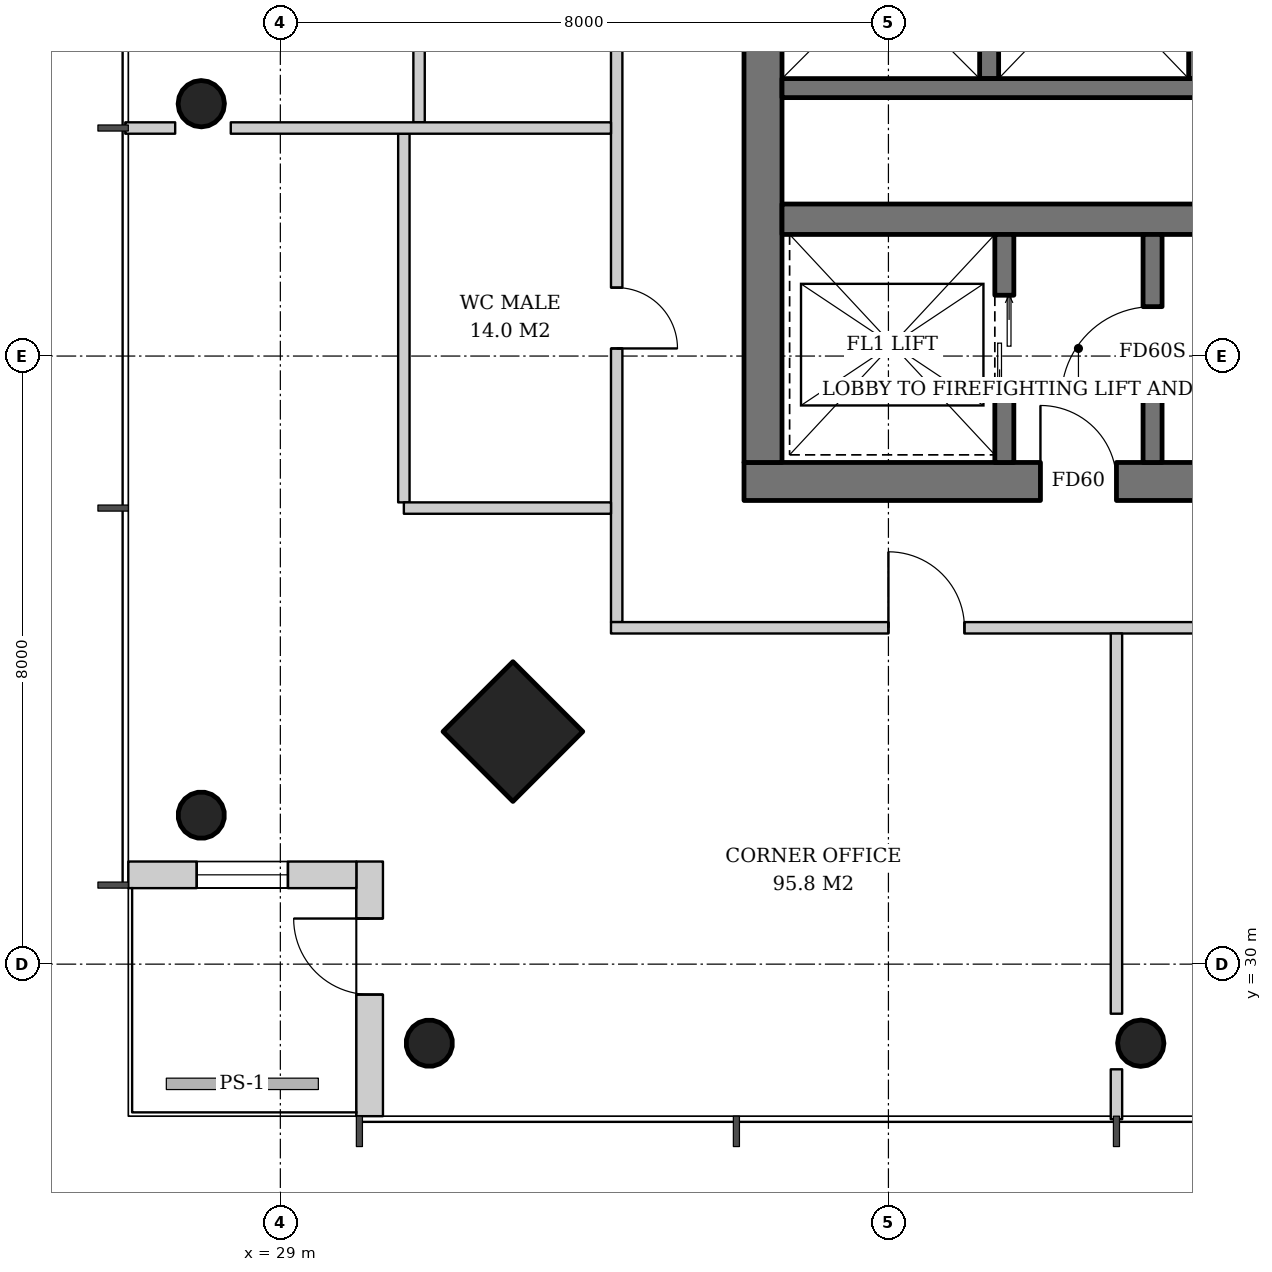
"""IFC4 building model, lengths in metres.
Left out: names, types, materials, properties, quantities, classifications, styles, units other than length and angle.
Written with IfcOpenShell. Run it as: python <this file> out.ifc"""

import sys

from ifc_helpers import new_model, si_unit, direction, frame, frame_2d, origin, origin_2d, place, context, subcontext, project, spatial, rectangle, hollow_circle, extrude, element, fill, save


model = new_model("IFC4")
c1 = context("Model", 3, precision=1e-05, world=origin(), true_north=direction((0.0, 1.0)))
c2 = subcontext(c1, "Body", "Model", "MODEL_VIEW")
j1 = project(units=[si_unit("LENGTHUNIT", "METRE"), si_unit("PLANEANGLEUNIT", "RADIAN")], contexts=[c1])
p1 = place(None, origin())
s1 = spatial("IfcSite", under=j1, at=p1, CompositionType="ELEMENT")
p2 = place(p1, origin())
s2 = spatial("IfcBuilding", under=s1, at=p2, CompositionType="ELEMENT")
p3 = place(p2, frame((0.0, 0.0, 237.6)))
s3 = spatial("IfcBuildingStorey", under=s2, at=p3, CompositionType="ELEMENT", Elevation=237.6)
p4 = place(p3, frame((32.021, 33.021, 0.0), z_axis=(0.031900153262, 0.031900153262, 0.998981861919), x_axis=(-0.707106781187, 0.707106781187, 0.0)))
e1 = element("IfcColumn", 1, at=p4, inside=s3, PredefinedType="COLUMN", context=c2, shape_type="SweptSolid", body=[
    extrude(rectangle(XDim=1.3, YDim=1.3, at=origin_2d()), origin(), (0.0, 0.0, 1.0), 3.804),
])
p5 = place(p3, frame((27.921, 31.921, 0.0), z_axis=(0.031964207655, 0.031964207655, 0.998977766949), x_axis=(-0.707106781187, 0.707106781187, 0.0)))
e2 = element("IfcColumn", 2, at=p5, inside=s3, PredefinedType="COLUMN", context=c2, shape_type="SweptSolid", body=[
    extrude(hollow_circle(Radius=0.305, WallThickness=0.025, at=origin_2d()), origin(), (0.0, 0.0, 1.0), 3.804),
])
p6 = place(p3, frame((27.921, 41.307, 0.0), z_axis=(0.031978732291, 0.01065957743, 0.999431705566), x_axis=(-0.316227766017, 0.948683298051, 0.0)))
e3 = element("IfcColumn", 3, at=p6, inside=s3, PredefinedType="COLUMN", context=c2, shape_type="SweptSolid", body=[
    extrude(hollow_circle(Radius=0.305, WallThickness=0.025, at=origin_2d()), origin(), (0.0, 0.0, 1.0), 3.802),
])
p7 = place(p3, frame((30.921, 28.921, 0.0), z_axis=(0.031964207655, 0.031964207655, 0.998977766949), x_axis=(-0.707106781187, 0.707106781187, 0.0)))
e4 = element("IfcColumn", 4, at=p7, inside=s3, PredefinedType="COLUMN", context=c2, shape_type="SweptSolid", body=[
    extrude(hollow_circle(Radius=0.305, WallThickness=0.025, at=origin_2d()), origin(), (0.0, 0.0, 1.0), 3.804),
])
p8 = place(p3, frame((40.307, 28.921, 0.0), z_axis=(0.01065957743, 0.031978732291, 0.999431705566), x_axis=(-0.948683298051, 0.316227766017, 0.0)))
e5 = element("IfcColumn", 5, at=p8, inside=s3, PredefinedType="COLUMN", context=c2, shape_type="SweptSolid", body=[
    extrude(hollow_circle(Radius=0.305, WallThickness=0.025, at=origin_2d()), origin(), (0.0, 0.0, 1.0), 3.802),
])
p9 = place(p3, frame((35.1, 36.35, 0.0), z_axis=(0.0, 0.0, 1.0), x_axis=(1.0, 0.0, 0.0)))
e6 = element("IfcWall", 6, at=p9, inside=s3, PredefinedType="SHEAR", context=c2, shape_type="SweptSolid", body=[
    extrude(rectangle(XDim=19.8, YDim=0.5, at=frame_2d((9.9, 0.0))), origin(), (0.0, 0.0, 1.0), 3.8),
])
p10 = place(p9, frame((3.9, 0.0, 0.0)))
e7 = element("IfcOpeningElement", 7, at=p10, cuts=e6, PredefinedType="OPENING", context=c2, shape_type="SweptSolid", body=[
    extrude(rectangle(XDim=1.0, YDim=2.1, at=frame_2d((0.5, 1.05))), frame((0.0, 0.26, 0.0), z_axis=(0.0, -1.0, 0.0), x_axis=(1.0, 0.0, 0.0)), (0.0, 0.0, 1.0), 0.52),
])
p11 = place(p9, frame((15.35, 0.0, 0.0)))
e8 = element("IfcOpeningElement", 8, at=p11, cuts=e6, PredefinedType="OPENING", context=c2, shape_type="SweptSolid", body=[
    extrude(rectangle(XDim=1.0, YDim=2.1, at=frame_2d((0.5, 1.05))), frame((0.0, 0.26, 0.0), z_axis=(0.0, -1.0, 0.0), x_axis=(1.0, 0.0, 0.0)), (0.0, 0.0, 1.0), 0.52),
])
p12 = place(p3, frame((35.35, 36.6, 0.0), z_axis=(0.0, 0.0, 1.0), x_axis=(0.0, 1.0, 0.0)))
e9 = element("IfcWall", 9, at=p12, inside=s3, PredefinedType="SHEAR", context=c2, shape_type="SweptSolid", body=[
    extrude(rectangle(XDim=18.8, YDim=0.5, at=frame_2d((9.4, 0.0))), origin(), (0.0, 0.0, 1.0), 3.8),
])
p13 = place(p12, frame((8.5, 0.0, 0.0)))
e10 = element("IfcOpeningElement", 10, at=p13, cuts=e9, PredefinedType="OPENING", context=c2, shape_type="SweptSolid", body=[
    extrude(rectangle(XDim=1.8, YDim=2.4, at=frame_2d((0.9, 1.2))), frame((0.0, 0.26, 0.0), z_axis=(0.0, -1.0, 0.0), x_axis=(1.0, 0.0, 0.0)), (0.0, 0.0, 1.0), 0.52),
])
p14 = place(p3, frame((35.6, 39.8, 0.0), z_axis=(0.0, 0.0, 1.0), x_axis=(1.0, 0.0, 0.0)))
e11 = element("IfcWall", 11, at=p14, inside=s3, PredefinedType="SHEAR", context=c2, shape_type="SweptSolid", body=[
    extrude(rectangle(XDim=18.8, YDim=0.4, at=frame_2d((9.4, 0.0))), origin(), (0.0, 0.0, 1.0), 3.8),
])
p15 = place(p3, frame((30.175, 28.0, 0.0), z_axis=(0.0, 0.0, 1.0), x_axis=(0.0, 1.0, 0.0)))
e12 = element("IfcWall", 12, at=p15, inside=s3, PredefinedType="SOLIDWALL", context=c2, shape_type="SweptSolid", body=[
    extrude(rectangle(XDim=3.35, YDim=0.35, at=frame_2d((1.675, 0.0))), origin(), (0.0, 0.0, 1.0), 3.62),
])
p16 = place(p15, frame((1.6, 0.0, 0.0)))
e13 = element("IfcOpeningElement", 13, at=p16, cuts=e12, PredefinedType="OPENING", context=c2, shape_type="SweptSolid", body=[
    extrude(rectangle(XDim=1.0, YDim=2.4, at=frame_2d((0.5, 1.2))), frame((0.0, 0.185, 0.0), z_axis=(0.0, -1.0, 0.0), x_axis=(1.0, 0.0, 0.0)), (0.0, 0.0, 1.0), 0.37),
])
p17 = place(p3, frame((30.0, 31.175, 0.0), z_axis=(0.0, 0.0, 1.0), x_axis=(-1.0, 0.0, 0.0)))
e14 = element("IfcWall", 14, at=p17, inside=s3, PredefinedType="SOLIDWALL", context=c2, shape_type="SweptSolid", body=[
    extrude(rectangle(XDim=3.0, YDim=0.35, at=frame_2d((1.5, 0.0))), origin(), (0.0, 0.0, 1.0), 3.62),
])
p18 = place(p17, frame((0.9, 0.0, 0.6)))
e15 = element("IfcOpeningElement", 15, at=p18, cuts=e14, PredefinedType="OPENING", context=c2, shape_type="SweptSolid", body=[
    extrude(rectangle(XDim=1.2, YDim=2.55, at=frame_2d((0.6, 1.275))), frame((0.0, 0.185, 0.0), z_axis=(0.0, -1.0, 0.0), x_axis=(1.0, 0.0, 0.0)), (0.0, 0.0, 1.0), 0.37),
])
p19 = place(p3, frame((38.525, 36.6, 0.0), z_axis=(0.0, 0.0, 1.0), x_axis=(0.0, 1.0, 0.0)))
e16 = element("IfcWall", 16, at=p19, inside=s3, PredefinedType="SHEAR", context=c2, shape_type="SweptSolid", body=[
    extrude(rectangle(XDim=3.0, YDim=0.25, at=frame_2d((1.5, 0.0))), origin(), (0.0, 0.0, 1.0), 3.8),
])
p20 = place(p19, frame((0.9, 0.0, 0.0)))
e17 = element("IfcOpeningElement", 17, at=p20, cuts=e16, PredefinedType="OPENING", context=c2, shape_type="SweptSolid", body=[
    extrude(rectangle(XDim=1.3, YDim=2.2, at=frame_2d((0.65, 1.1))), frame((0.0, 0.135, 0.0), z_axis=(0.0, -1.0, 0.0), x_axis=(1.0, 0.0, 0.0)), (0.0, 0.0, 1.0), 0.27),
])
p21 = place(p3, frame((40.475, 36.6, 0.0), z_axis=(0.0, 0.0, 1.0), x_axis=(0.0, 1.0, 0.0)))
e18 = element("IfcWall", 18, at=p21, inside=s3, PredefinedType="SHEAR", context=c2, shape_type="SweptSolid", body=[
    extrude(rectangle(XDim=3.0, YDim=0.25, at=frame_2d((1.5, 0.0))), origin(), (0.0, 0.0, 1.0), 3.8),
])
p22 = place(p21, frame((0.85, 0.0, 0.0)))
e19 = element("IfcOpeningElement", 19, at=p22, cuts=e18, PredefinedType="OPENING", context=c2, shape_type="SweptSolid", body=[
    extrude(rectangle(XDim=1.2, YDim=2.1, at=frame_2d((0.6, 1.05))), frame((0.0, 0.135, 0.0), z_axis=(0.0, -1.0, 0.0), x_axis=(1.0, 0.0, 0.0)), (0.0, 0.0, 1.0), 0.27),
])
for number, where, z_axis, x_axis in (
    (20, (38.325, 44.25, 0.0), (0.0, 0.0, 1.0), (0.0, -1.0, 0.0)),
    (21, (41.075, 44.25, 0.0), (0.0, 0.0, 1.0), (0.0, -1.0, 0.0)),
):
    element("IfcWall", number, at=place(p3, frame(where, z_axis=z_axis, x_axis=x_axis)), inside=s3, PredefinedType="SHEAR", context=c2, shape_type="SweptSolid", body=[
        extrude(rectangle(XDim=2.6, YDim=0.25, at=frame_2d((1.3, 0.0))), origin(), (0.0, 0.0, 1.0), 3.8),
    ])
p23 = place(p3, frame((35.6, 41.525, 0.0), z_axis=(0.0, 0.0, 1.0), x_axis=(1.0, 0.0, 0.0)))
e22 = element("IfcWall", 22, at=p23, inside=s3, PredefinedType="SHEAR", context=c2, shape_type="SweptSolid", body=[
    extrude(rectangle(XDim=11.1, YDim=0.25, at=frame_2d((5.55, 0.0))), origin(), (0.0, 0.0, 1.0), 3.8),
])
for number, where, z_axis, x_axis in (
    (23, (30.825, 45.925, 0.0), (0.0, 0.0, 1.0), (0.0, -1.0, 0.0)),
    (24, (30.625, 40.925, 0.0), (0.0, 0.0, 1.0), (0.0, -1.0, 0.0)),
):
    element("IfcWall", number, at=place(p3, frame(where, z_axis=z_axis, x_axis=x_axis)), inside=s3, PredefinedType="PARTITIONING", context=c2, shape_type="SweptSolid", body=[
        extrude(rectangle(XDim=4.85, YDim=0.15, at=frame_2d((2.425, 0.0))), origin(), (0.0, 0.0, 1.0), 3.12),
    ])
p24 = place(p3, frame((33.425, 57.65, 0.0), z_axis=(0.0, 0.0, 1.0), x_axis=(0.0, -1.0, 0.0)))
e25 = element("IfcWall", 25, at=p24, inside=s3, PredefinedType="PARTITIONING", context=c2, shape_type="SweptSolid", body=[
    extrude(rectangle(XDim=23.15, YDim=0.15, at=frame_2d((11.575, 0.0))), origin(), (0.0, 0.0, 1.0), 3.02),
])
p25 = place(p24, frame((3.65, 0.0, 0.0)))
e26 = element("IfcOpeningElement", 26, at=p25, cuts=e25, PredefinedType="OPENING", context=c2, shape_type="SweptSolid", body=[
    extrude(rectangle(XDim=1.0, YDim=2.1, at=frame_2d((0.5, 1.05))), frame((0.0, 0.085, 0.0), z_axis=(0.0, -1.0, 0.0), x_axis=(1.0, 0.0, 0.0)), (0.0, 0.0, 1.0), 0.17),
])
p26 = place(p24, frame((8.75, 0.0, 0.0)))
e27 = element("IfcOpeningElement", 27, at=p26, cuts=e25, PredefinedType="OPENING", context=c2, shape_type="SweptSolid", body=[
    extrude(rectangle(XDim=0.8, YDim=2.1, at=frame_2d((0.4, 1.05))), frame((0.0, 0.085, 0.0), z_axis=(0.0, -1.0, 0.0), x_axis=(1.0, 0.0, 0.0)), (0.0, 0.0, 1.0), 0.17),
])
p27 = place(p24, frame((13.65, 0.0, 0.0)))
e28 = element("IfcOpeningElement", 28, at=p27, cuts=e25, PredefinedType="OPENING", context=c2, shape_type="SweptSolid", body=[
    extrude(rectangle(XDim=1.0, YDim=2.1, at=frame_2d((0.5, 1.05))), frame((0.0, 0.085, 0.0), z_axis=(0.0, -1.0, 0.0), x_axis=(1.0, 0.0, 0.0)), (0.0, 0.0, 1.0), 0.17),
])
p28 = place(p24, frame((18.75, 0.0, 0.0)))
e29 = element("IfcOpeningElement", 29, at=p28, cuts=e25, PredefinedType="OPENING", context=c2, shape_type="SweptSolid", body=[
    extrude(rectangle(XDim=0.8, YDim=2.1, at=frame_2d((0.4, 1.05))), frame((0.0, 0.085, 0.0), z_axis=(0.0, -1.0, 0.0), x_axis=(1.0, 0.0, 0.0)), (0.0, 0.0, 1.0), 0.17),
])
p29 = place(p3, frame((33.35, 41.0, 0.0), z_axis=(0.0, 0.0, 1.0), x_axis=(-1.0, 0.0, 0.0)))
e30 = element("IfcWall", 30, at=p29, inside=s3, PredefinedType="PARTITIONING", context=c2, shape_type="SweptSolid", body=[
    extrude(rectangle(XDim=5.002, YDim=0.15, at=frame_2d((2.501, 0.0))), origin(), (0.0, 0.0, 1.0), 3.62),
])
p30 = place(p3, frame((27.616, 41.0, 0.0), z_axis=(0.0, 0.0, 1.0), x_axis=(-1.0, 0.0, 0.0)))
e31 = element("IfcWall", 31, at=p30, inside=s3, PredefinedType="PARTITIONING", context=c2, shape_type="SweptSolid", body=[
    extrude(rectangle(XDim=0.656, YDim=0.15, at=frame_2d((0.328, 0.0))), origin(), (0.0, 0.0, 1.0), 3.62),
])
p31 = place(p3, frame((33.35, 36.0, 0.0), z_axis=(0.0, 0.0, 1.0), x_axis=(-1.0, 0.0, 0.0)))
e32 = element("IfcWall", 32, at=p31, inside=s3, PredefinedType="PARTITIONING", context=c2, shape_type="SweptSolid", body=[
    extrude(rectangle(XDim=2.725, YDim=0.15, at=frame_2d((1.363, 0.0))), origin(), (0.0, 0.0, 1.0), 3.62),
])
p32 = place(p3, frame((33.35, 34.425, 0.0), z_axis=(0.0, 0.0, 1.0), x_axis=(1.0, 0.0, 0.0)))
e33 = element("IfcWall", 33, at=p32, inside=s3, PredefinedType="PARTITIONING", context=c2, shape_type="SweptSolid", body=[
    extrude(rectangle(XDim=23.15, YDim=0.15, at=frame_2d((11.575, 0.0))), origin(), (0.0, 0.0, 1.0), 3.02),
])
p33 = place(p32, frame((3.65, 0.0, 0.0)))
e34 = element("IfcOpeningElement", 34, at=p33, cuts=e33, PredefinedType="OPENING", context=c2, shape_type="SweptSolid", body=[
    extrude(rectangle(XDim=1.0, YDim=2.1, at=frame_2d((0.5, 1.05))), frame((0.0, 0.085, 0.0), z_axis=(0.0, -1.0, 0.0), x_axis=(1.0, 0.0, 0.0)), (0.0, 0.0, 1.0), 0.17),
])
p34 = place(p32, frame((8.65, 0.0, 0.0)))
e35 = element("IfcOpeningElement", 35, at=p34, cuts=e33, PredefinedType="OPENING", context=c2, shape_type="SweptSolid", body=[
    extrude(rectangle(XDim=1.0, YDim=2.1, at=frame_2d((0.5, 1.05))), frame((0.0, 0.085, 0.0), z_axis=(0.0, -1.0, 0.0), x_axis=(1.0, 0.0, 0.0)), (0.0, 0.0, 1.0), 0.17),
])
p35 = place(p32, frame((13.65, 0.0, 0.0)))
e36 = element("IfcOpeningElement", 36, at=p35, cuts=e33, PredefinedType="OPENING", context=c2, shape_type="SweptSolid", body=[
    extrude(rectangle(XDim=1.0, YDim=2.1, at=frame_2d((0.5, 1.05))), frame((0.0, 0.085, 0.0), z_axis=(0.0, -1.0, 0.0), x_axis=(1.0, 0.0, 0.0)), (0.0, 0.0, 1.0), 0.17),
])
p36 = place(p3, frame((40.0, 34.35, 0.0), z_axis=(0.0, 0.0, 1.0), x_axis=(0.0, -1.0, 0.0)))
e37 = element("IfcWall", 37, at=p36, inside=s3, PredefinedType="PARTITIONING", context=c2, shape_type="SweptSolid", body=[
    extrude(rectangle(XDim=5.002, YDim=0.15, at=frame_2d((2.501, 0.0))), origin(), (0.0, 0.0, 1.0), 3.62),
])
p37 = place(p3, frame((40.0, 28.616, 0.0), z_axis=(0.0, 0.0, 1.0), x_axis=(0.0, -1.0, 0.0)))
e38 = element("IfcWall", 38, at=p37, inside=s3, PredefinedType="PARTITIONING", context=c2, shape_type="SweptSolid", body=[
    extrude(rectangle(XDim=0.656, YDim=0.15, at=frame_2d((0.328, 0.0))), origin(), (0.0, 0.0, 1.0), 3.62),
])
p38 = place(p16, origin())
e39 = element("IfcDoor", 39, at=p38, inside=s3, OperationType="SINGLE_SWING_RIGHT", PredefinedType="DOOR", context=c2, shape_type="SweptSolid", body=[
    extrude(rectangle(XDim=1.0, YDim=2.4, at=frame_2d((0.5, 1.2))), frame((0.0, 0.025, 0.0), z_axis=(0.0, -1.0, 0.0), x_axis=(1.0, 0.0, 0.0)), (0.0, 0.0, 1.0), 0.05),
])
fill(e13, e39)
p39 = place(p18, origin())
e40 = element("IfcWindow", 40, at=p39, inside=s3, PartitioningType="SINGLE_PANEL", PredefinedType="WINDOW", context=c2, shape_type="SweptSolid", body=[
    extrude(rectangle(XDim=1.2, YDim=2.55, at=frame_2d((0.6, 1.275))), frame((0.0, 0.03, 0.0), z_axis=(0.0, -1.0, 0.0), x_axis=(1.0, 0.0, 0.0)), (0.0, 0.0, 1.0), 0.06),
])
fill(e15, e40)
p40 = place(p20, origin())
e41 = element("IfcDoor", 41, at=p40, inside=s3, OperationType="DOUBLE_DOOR_SLIDING", PredefinedType="DOOR", context=c2, shape_type="SweptSolid", body=[
    extrude(rectangle(XDim=1.3, YDim=2.2, at=frame_2d((0.65, 1.1))), frame((0.0, 0.025, 0.0), z_axis=(0.0, -1.0, 0.0), x_axis=(1.0, 0.0, 0.0)), (0.0, 0.0, 1.0), 0.05),
])
fill(e17, e41)
p41 = place(p22, origin())
e42 = element("IfcDoor", 42, at=p41, inside=s3, OperationType="SINGLE_SWING_LEFT", PredefinedType="DOOR", context=c2, shape_type="SweptSolid", body=[
    extrude(rectangle(XDim=1.2, YDim=2.1, at=frame_2d((0.6, 1.05))), frame((0.0, 0.025, 0.0), z_axis=(0.0, -1.0, 0.0), x_axis=(1.0, 0.0, 0.0)), (0.0, 0.0, 1.0), 0.05),
])
fill(e19, e42)
p42 = place(p10, origin())
e43 = element("IfcDoor", 43, at=p42, inside=s3, OperationType="SINGLE_SWING_LEFT", PredefinedType="DOOR", context=c2, shape_type="SweptSolid", body=[
    extrude(rectangle(XDim=1.0, YDim=2.1, at=frame_2d((0.5, 1.05))), frame((0.0, 0.025, 0.0), z_axis=(0.0, -1.0, 0.0), x_axis=(1.0, 0.0, 0.0)), (0.0, 0.0, 1.0), 0.05),
])
fill(e7, e43)
p43 = place(p28, origin())
e44 = element("IfcDoor", 44, at=p43, inside=s3, OperationType="SINGLE_SWING_RIGHT", PredefinedType="DOOR", context=c2, shape_type="SweptSolid", body=[
    extrude(rectangle(XDim=0.8, YDim=2.1, at=frame_2d((0.4, 1.05))), frame((0.0, 0.025, 0.0), z_axis=(0.0, -1.0, 0.0), x_axis=(1.0, 0.0, 0.0)), (0.0, 0.0, 1.0), 0.05),
])
fill(e29, e44)
p44 = place(p33, origin())
e45 = element("IfcDoor", 45, at=p44, inside=s3, OperationType="SINGLE_SWING_LEFT", PredefinedType="DOOR", context=c2, shape_type="SweptSolid", body=[
    extrude(rectangle(XDim=1.0, YDim=2.1, at=frame_2d((0.5, 1.05))), frame((0.0, 0.025, 0.0), z_axis=(0.0, -1.0, 0.0), x_axis=(1.0, 0.0, 0.0)), (0.0, 0.0, 1.0), 0.05),
])
fill(e34, e45)
save(model, sys.argv[1])
